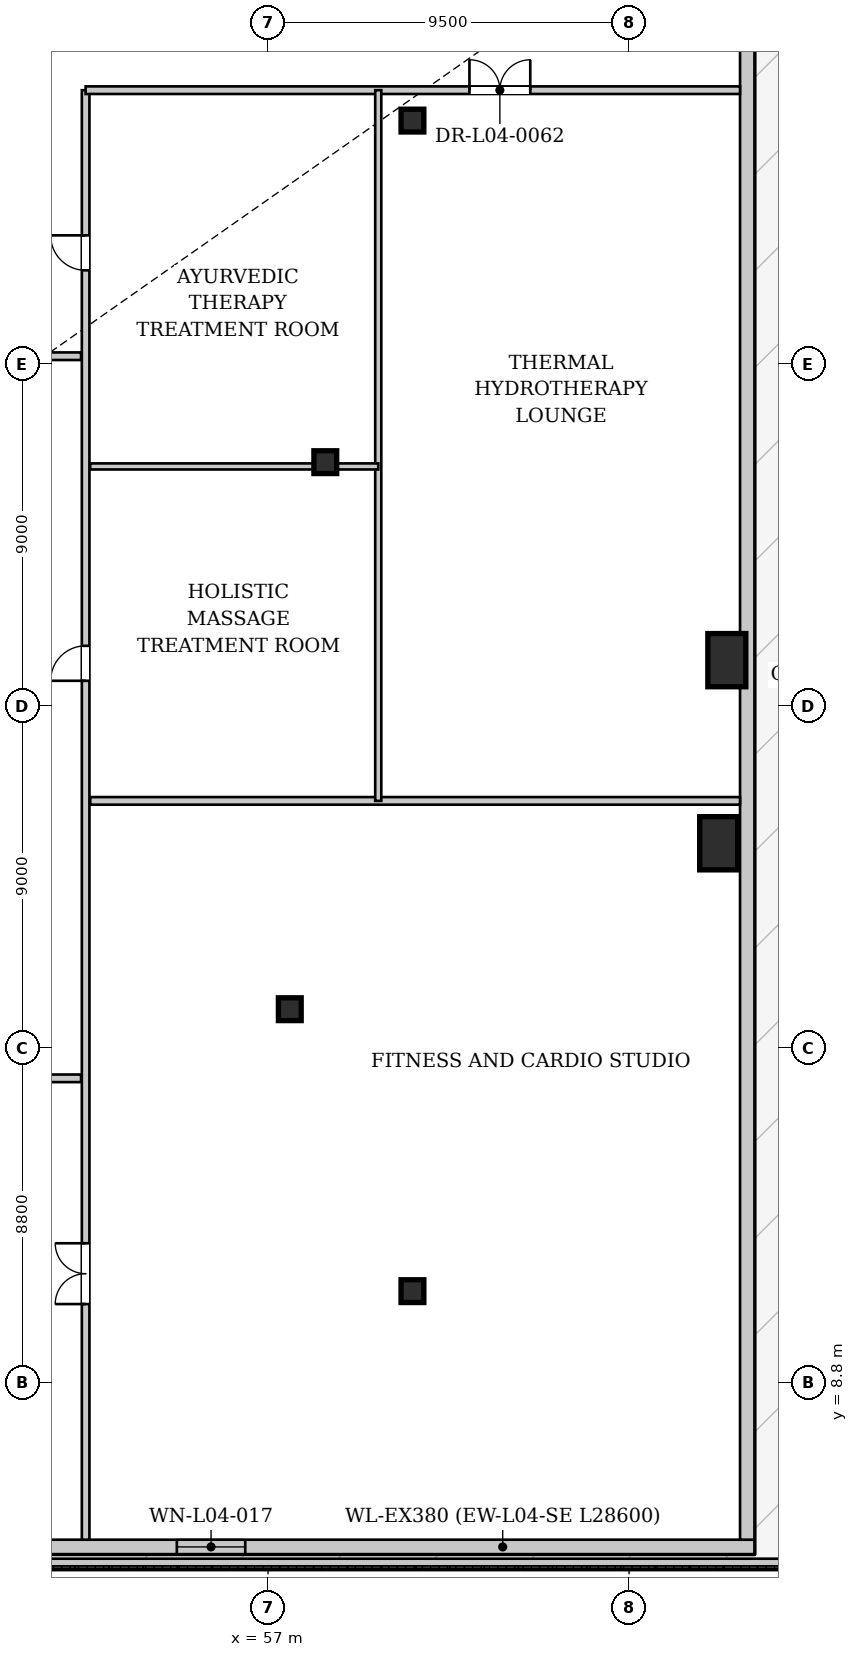
"""IFC4 building model, lengths in metres.
Left out: names, types, materials, properties, quantities, classifications, styles, units other than length and angle.
Written with IfcOpenShell. Run it as: python <this file> out.ifc"""

import sys

from ifc_helpers import new_model, si_unit, direction, frame, frame_2d, origin, origin_2d, place, context, subcontext, project, spatial, rectangle, hollow_rectangle, extrude, source, transform, mapped, element, fill, save


model = new_model("IFC4")
c1 = context("Model", 3, precision=1e-05, world=origin(), true_north=direction((0.0, 1.0)))
c2 = subcontext(c1, "Body", "Model", "MODEL_VIEW")
j1 = project(units=[si_unit("LENGTHUNIT", "METRE"), si_unit("PLANEANGLEUNIT", "RADIAN")], contexts=[c1])
p1 = place(None, origin())
s1 = spatial("IfcSite", under=j1, at=p1, CompositionType="ELEMENT")
p2 = place(p1, origin())
s2 = spatial("IfcBuilding", under=s1, at=p2, CompositionType="ELEMENT")
p3 = place(p2, frame((0.0, 0.0, 20.1)))
s3 = spatial("IfcBuildingStorey", under=s2, at=p3, CompositionType="ELEMENT", Elevation=20.1)
m1 = source(origin(), c2, "Body", "SweptSolid", [
    extrude(rectangle(XDim=1.0, YDim=1.4, at=origin_2d()), origin(), (0.0, 0.0, 1.0), 4.335),
])
for number, where, z_axis, x_axis in (
    (1, (68.858, 22.985, 0.0), (0.0, 0.0, 1.0), (1.0, 0.0, 0.0)),
    (2, (69.073, 27.803, 0.0), (0.0, 0.0, 1.0), (1.0, 0.0, 0.0)),
):
    element("IfcColumn", number, at=place(p3, frame(where, z_axis=z_axis, x_axis=x_axis)), inside=s3, PredefinedType="COLUMN", context=c2, shape_type="MappedRepresentation", body=[
        mapped(m1, transform((0.0, 0.0, 0.0), x_axis=(1.0, 0.0, 0.0), y_axis=(0.0, 1.0, 0.0), z_axis=(0.0, 0.0, 1.0), scale=1.0)),
    ])
m2 = source(origin(), c2, "Body", "SweptSolid", [
    extrude(hollow_rectangle(XDim=0.6, YDim=0.6, WallThickness=0.035, at=origin_2d()), origin(), (0.0, 0.0, 1.0), 4.335),
])
for number, where, z_axis, x_axis in (
    (3, (60.8, 11.2, 0.0), (0.0, 0.0, 1.0), (1.0, 0.0, 0.0)),
    (4, (60.8, 42.0, 0.0), (0.0, 0.0, 1.0), (1.0, 0.0, 0.0)),
):
    element("IfcColumn", number, at=place(p3, frame(where, z_axis=z_axis, x_axis=x_axis)), inside=s3, PredefinedType="COLUMN", context=c2, shape_type="MappedRepresentation", body=[
        mapped(m2, transform((0.0, 0.0, 0.0), x_axis=(1.0, 0.0, 0.0), y_axis=(0.0, 1.0, 0.0), z_axis=(0.0, 0.0, 1.0), scale=1.0)),
    ])
m3 = source(origin(), c2, "Body", "SweptSolid", [
    extrude(hollow_rectangle(XDim=0.6, YDim=0.6, WallThickness=0.035, at=origin_2d()), origin(), (0.0, 0.0, 1.0), 3.28),
])
for number, where, z_axis, x_axis in (
    (5, (58.507, 33.013, 0.0), (0.0, 0.0, 1.0), (1.0, 0.0, 0.0)),
    (6, (57.572, 18.618, 0.0), (0.0, 0.0, 1.0), (1.0, 0.0, 0.0)),
):
    element("IfcColumn", number, at=place(p3, frame(where, z_axis=z_axis, x_axis=x_axis)), inside=s3, PredefinedType="COLUMN", context=c2, shape_type="MappedRepresentation", body=[
        mapped(m3, transform((0.0, 0.0, 0.0), x_axis=(1.0, 0.0, 0.0), y_axis=(0.0, 1.0, 0.0), z_axis=(0.0, 0.0, 1.0), scale=1.0)),
    ])
p4 = place(p3, frame((69.8, 4.47, 0.0), z_axis=(0.0, 0.0, 1.0), x_axis=(-1.0, 0.0, 0.0)))
e7 = element("IfcWall", 7, at=p4, inside=s3, PredefinedType="SOLIDWALL", context=c2, shape_type="SweptSolid", body=[
    extrude(rectangle(XDim=28.6, YDim=0.38, at=frame_2d((14.3, 0.0))), origin(), (0.0, 0.0, 1.0), 3.2),
])
p5 = place(p4, frame((13.4, 0.0, 0.68)))
e8 = element("IfcOpeningElement", 8, at=p5, cuts=e7, PredefinedType="OPENING", context=c2, shape_type="SweptSolid", body=[
    extrude(rectangle(XDim=1.8, YDim=2.4, at=frame_2d((0.9, 1.2))), frame((0.0, 0.2, 0.0), z_axis=(0.0, -1.0, 0.0), x_axis=(1.0, 0.0, 0.0)), (0.0, 0.0, 1.0), 0.4),
])
p6 = place(p3, frame((69.61, 48.54, 0.0), z_axis=(0.0, 0.0, 1.0), x_axis=(0.0, -1.0, 0.0)))
e9 = element("IfcWall", 9, at=p6, inside=s3, PredefinedType="SOLIDWALL", context=c2, shape_type="SweptSolid", body=[
    extrude(rectangle(XDim=43.88, YDim=0.38, at=frame_2d((21.94, 0.0))), origin(), (0.0, 0.0, 1.0), 3.2),
])
p7 = place(p3, frame((5.35, 4.02, 0.0), z_axis=(0.0, 0.0, 1.0), x_axis=(1.0, 0.0, 0.0)))
e10 = element("IfcWall", 10, at=p7, inside=s3, PredefinedType="PARAPET", context=c2, shape_type="SweptSolid", body=[
    extrude(rectangle(XDim=65.3, YDim=0.28, at=frame_2d((32.65, 0.0))), origin(), (0.0, 0.0, 1.0), 0.45),
])
p8 = place(p3, frame((23.92, 16.8, 0.0), z_axis=(0.0, 0.0, 1.0), x_axis=(1.0, 0.0, 0.0)))
e11 = element("IfcWall", 11, at=p8, inside=s3, PredefinedType="PARTITIONING", context=c2, shape_type="SweptSolid", body=[
    extrude(rectangle(XDim=28.16, YDim=0.2, at=frame_2d((14.08, 0.0))), origin(), (0.0, 0.0, 1.0), 3.43),
])
p9 = place(p8, frame((13.5, 0.0, 0.0)))
e12 = element("IfcOpeningElement", 12, at=p9, cuts=e11, PredefinedType="OPENING", context=c2, shape_type="SweptSolid", body=[
    extrude(rectangle(XDim=1.6, YDim=2.2, at=frame_2d((0.8, 1.1))), frame((0.0, 0.11, 0.0), z_axis=(0.0, -1.0, 0.0), x_axis=(1.0, 0.0, 0.0)), (0.0, 0.0, 1.0), 0.22),
])
p10 = place(p3, frame((52.2, 4.66, 0.0), z_axis=(0.0, 0.0, 1.0), x_axis=(0.0, 1.0, 0.0)))
e13 = element("IfcWall", 13, at=p10, inside=s3, PredefinedType="PARTITIONING", context=c2, shape_type="SweptSolid", body=[
    extrude(rectangle(XDim=38.14, YDim=0.2, at=frame_2d((19.07, 0.0))), origin(), (0.0, 0.0, 1.0), 3.43),
])
p11 = place(p10, frame((6.2, 0.0, 0.0)))
e14 = element("IfcOpeningElement", 14, at=p11, cuts=e13, PredefinedType="OPENING", context=c2, shape_type="SweptSolid", body=[
    extrude(rectangle(XDim=1.6, YDim=2.2, at=frame_2d((0.8, 1.1))), frame((0.0, 0.11, 0.0), z_axis=(0.0, -1.0, 0.0), x_axis=(1.0, 0.0, 0.0)), (0.0, 0.0, 1.0), 0.22),
])
p12 = place(p10, frame((22.6, 0.0, 0.0)))
e15 = element("IfcOpeningElement", 15, at=p12, cuts=e13, PredefinedType="OPENING", context=c2, shape_type="SweptSolid", body=[
    extrude(rectangle(XDim=0.92, YDim=2.1, at=frame_2d((0.46, 1.05))), frame((0.0, 0.11, 0.0), z_axis=(0.0, -1.0, 0.0), x_axis=(1.0, 0.0, 0.0)), (0.0, 0.0, 1.0), 0.22),
])
p13 = place(p10, frame((33.4, 0.0, 0.0)))
e16 = element("IfcOpeningElement", 16, at=p13, cuts=e13, PredefinedType="OPENING", context=c2, shape_type="SweptSolid", body=[
    extrude(rectangle(XDim=0.92, YDim=2.1, at=frame_2d((0.46, 1.05))), frame((0.0, 0.11, 0.0), z_axis=(0.0, -1.0, 0.0), x_axis=(1.0, 0.0, 0.0)), (0.0, 0.0, 1.0), 0.22),
])
p14 = place(p3, frame((52.32, 24.1, 0.0), z_axis=(0.0, 0.0, 1.0), x_axis=(1.0, 0.0, 0.0)))
e17 = element("IfcWall", 17, at=p14, inside=s3, PredefinedType="PARTITIONING", context=c2, shape_type="SweptSolid", body=[
    extrude(rectangle(XDim=17.1, YDim=0.2, at=frame_2d((8.55, 0.0))), origin(), (0.0, 0.0, 1.0), 3.43),
])
p15 = place(p3, frame((52.2, 42.8, 0.0), z_axis=(0.0, 0.0, 1.0), x_axis=(1.0, 0.0, 0.0)))
e18 = element("IfcWall", 18, at=p15, inside=s3, PredefinedType="PARTITIONING", context=c2, shape_type="SweptSolid", body=[
    extrude(rectangle(XDim=17.22, YDim=0.2, at=frame_2d((8.61, 0.0))), origin(), (0.0, 0.0, 1.0), 3.43),
])
p16 = place(p15, frame((10.1, 0.0, 0.0)))
e19 = element("IfcOpeningElement", 19, at=p16, cuts=e18, PredefinedType="OPENING", context=c2, shape_type="SweptSolid", body=[
    extrude(rectangle(XDim=1.6, YDim=2.2, at=frame_2d((0.8, 1.1))), frame((0.0, 0.11, 0.0), z_axis=(0.0, -1.0, 0.0), x_axis=(1.0, 0.0, 0.0)), (0.0, 0.0, 1.0), 0.22),
])
p17 = place(p3, frame((59.9, 24.1, 0.0), z_axis=(0.0, 0.0, 1.0), x_axis=(0.0, 1.0, 0.0)))
e20 = element("IfcWall", 20, at=p17, inside=s3, PredefinedType="PARTITIONING", context=c2, shape_type="SweptSolid", body=[
    extrude(rectangle(XDim=18.7, YDim=0.16, at=frame_2d((9.35, 0.0))), origin(), (0.0, 0.0, 1.0), 3.43),
])
p18 = place(p3, frame((52.32, 32.9, 0.0), z_axis=(0.0, 0.0, 1.0), x_axis=(1.0, 0.0, 0.0)))
e21 = element("IfcWall", 21, at=p18, inside=s3, PredefinedType="PARTITIONING", context=c2, shape_type="SweptSolid", body=[
    extrude(rectangle(XDim=7.58, YDim=0.16, at=frame_2d((3.79, 0.0))), origin(), (0.0, 0.0, 1.0), 3.43),
])
p19 = place(p3, frame((31.2, 35.8, 0.0), z_axis=(0.0, 0.0, 1.0), x_axis=(1.0, 0.0, 0.0)))
e22 = element("IfcWall", 22, at=p19, inside=s3, PredefinedType="PARTITIONING", context=c2, shape_type="SweptSolid", body=[
    extrude(rectangle(XDim=20.88, YDim=0.2, at=frame_2d((10.44, 0.0))), origin(), (0.0, 0.0, 1.0), 3.43),
])
p20 = place(p19, frame((8.5, 0.0, 0.0)))
e23 = element("IfcOpeningElement", 23, at=p20, cuts=e22, PredefinedType="OPENING", context=c2, shape_type="SweptSolid", body=[
    extrude(rectangle(XDim=1.6, YDim=2.2, at=frame_2d((0.8, 1.1))), frame((0.0, 0.11, 0.0), z_axis=(0.0, -1.0, 0.0), x_axis=(1.0, 0.0, 0.0)), (0.0, 0.0, 1.0), 0.22),
])
m4 = source(origin(), c2, "Body", "SweptSolid", [
    extrude(rectangle(XDim=1.8, YDim=2.4, at=frame_2d((0.9, 1.2))), frame((0.0, 0.03, 0.0), z_axis=(0.0, -1.0, 0.0), x_axis=(1.0, 0.0, 0.0)), (0.0, 0.0, 1.0), 0.06),
])
p21 = place(p5, origin())
e24 = element("IfcWindow", 24, at=p21, inside=s3, PartitioningType="SINGLE_PANEL", PredefinedType="WINDOW", context=c2, shape_type="MappedRepresentation", body=[
    mapped(m4, transform((0.0, 0.0, 0.0), x_axis=(1.0, 0.0, 0.0), y_axis=(0.0, 1.0, 0.0), z_axis=(0.0, 0.0, 1.0), scale=1.0)),
])
fill(e8, e24)
m5 = source(origin(), c2, "Body", "SweptSolid", [
    extrude(rectangle(XDim=1.6, YDim=2.2, at=frame_2d((0.8, 1.1))), frame((0.0, 0.025, 0.0), z_axis=(0.0, -1.0, 0.0), x_axis=(1.0, 0.0, 0.0)), (0.0, 0.0, 1.0), 0.05),
])
p22 = place(p11, origin())
e25 = element("IfcDoor", 25, at=p22, inside=s3, OperationType="DOUBLE_DOOR_SINGLE_SWING", PredefinedType="DOOR", context=c2, shape_type="MappedRepresentation", body=[
    mapped(m5, transform((0.0, 0.0, 0.0), x_axis=(1.0, 0.0, 0.0), y_axis=(0.0, 1.0, 0.0), z_axis=(0.0, 0.0, 1.0), scale=1.0)),
])
fill(e14, e25)
m6 = source(origin(), c2, "Body", "SweptSolid", [
    extrude(rectangle(XDim=0.92, YDim=2.1, at=frame_2d((0.46, 1.05))), frame((0.0, 0.025, 0.0), z_axis=(0.0, -1.0, 0.0), x_axis=(1.0, 0.0, 0.0)), (0.0, 0.0, 1.0), 0.05),
])
p23 = place(p12, origin())
e26 = element("IfcDoor", 26, at=p23, inside=s3, OperationType="SINGLE_SWING_LEFT", PredefinedType="DOOR", context=c2, shape_type="MappedRepresentation", body=[
    mapped(m6, transform((0.0, 0.0, 0.0), x_axis=(1.0, 0.0, 0.0), y_axis=(0.0, 1.0, 0.0), z_axis=(0.0, 0.0, 1.0), scale=1.0)),
])
fill(e15, e26)
p24 = place(p13, origin())
e27 = element("IfcDoor", 27, at=p24, inside=s3, OperationType="SINGLE_SWING_RIGHT", PredefinedType="DOOR", context=c2, shape_type="MappedRepresentation", body=[
    mapped(m6, transform((0.0, 0.0, 0.0), x_axis=(1.0, 0.0, 0.0), y_axis=(0.0, 1.0, 0.0), z_axis=(0.0, 0.0, 1.0), scale=1.0)),
])
fill(e16, e27)
p25 = place(p16, origin())
e28 = element("IfcDoor", 28, at=p25, inside=s3, OperationType="DOUBLE_DOOR_SINGLE_SWING", PredefinedType="DOOR", context=c2, shape_type="MappedRepresentation", body=[
    mapped(m5, transform((0.0, 0.0, 0.0), x_axis=(1.0, 0.0, 0.0), y_axis=(0.0, 1.0, 0.0), z_axis=(0.0, 0.0, 1.0), scale=1.0)),
])
fill(e19, e28)
save(model, sys.argv[1])
